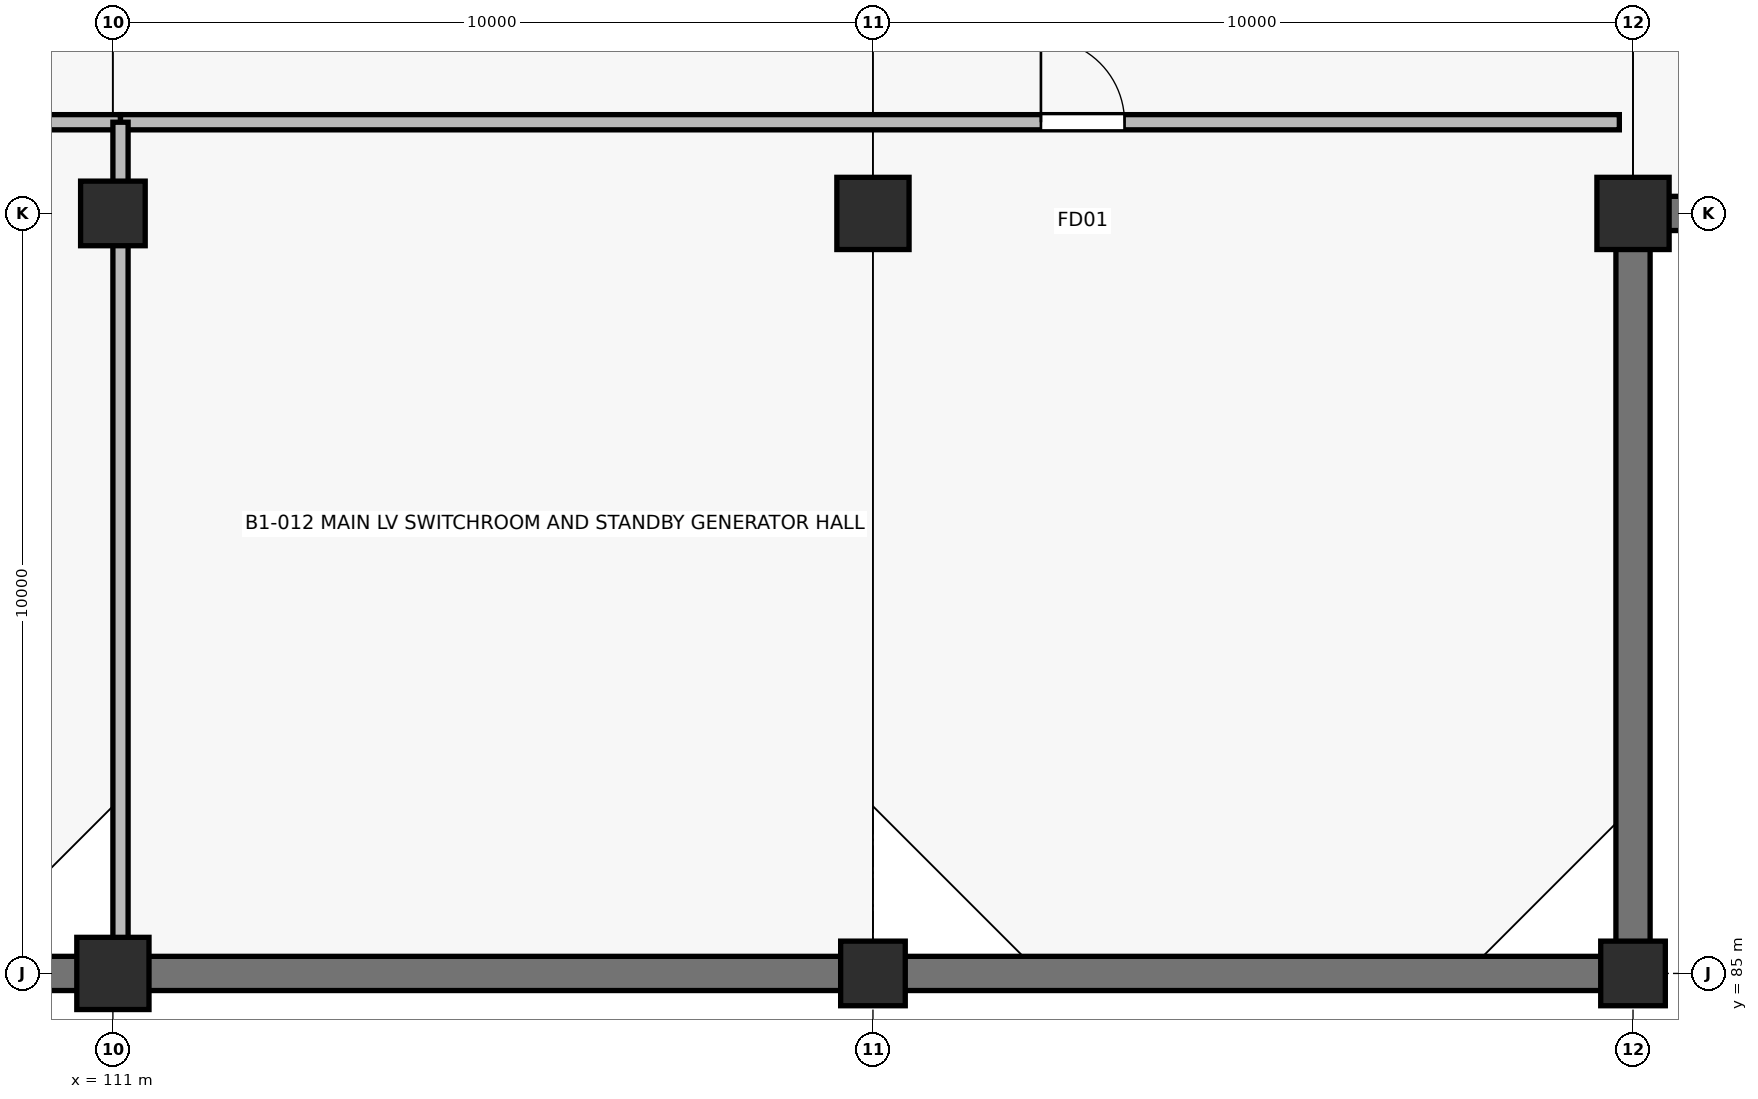
"""IFC4 building model, lengths in metres.
Left out: names, types, materials, properties, quantities, classifications, styles, units other than length and angle.
Written with IfcOpenShell. Run it as: python <this file> out.ifc"""

import sys

from ifc_helpers import new_model, si_unit, direction, frame, frame_2d, origin, origin_2d, place, context, subcontext, project, spatial, rectangle, extrude, element, fill, save


model = new_model("IFC4")
c1 = context("Model", 3, precision=1e-05, world=origin(), true_north=direction((0.0, 1.0)))
c2 = subcontext(c1, "Body", "Model", "MODEL_VIEW")
j1 = project(units=[si_unit("LENGTHUNIT", "METRE"), si_unit("PLANEANGLEUNIT", "RADIAN")], contexts=[c1])
p1 = place(None, origin())
s1 = spatial("IfcSite", under=j1, at=p1, CompositionType="ELEMENT")
p2 = place(p1, origin())
s2 = spatial("IfcBuilding", under=s1, at=p2, CompositionType="ELEMENT")
p3 = place(p2, frame((0.0, 0.0, -4.5)))
s3 = spatial("IfcBuildingStorey", under=s2, at=p3, CompositionType="ELEMENT", Elevation=-4.5)
p4 = place(p3, frame((111.0, 85.0, 0.0), z_axis=(0.0, 0.0, 1.0), x_axis=(1.0, 0.0, 0.0)))
e1 = element("IfcColumn", 1, at=p4, inside=s3, PredefinedType="COLUMN", context=c2, shape_type="SweptSolid", body=[
    extrude(rectangle(XDim=0.95, YDim=0.95, at=origin_2d()), origin(), (0.0, 0.0, 1.0), 4.5),
])
for number, where, z_axis, x_axis in (
    (2, (111.0, 95.0, 0.0), (0.0, 0.0, 1.0), (1.0, 0.0, 0.0)),
    (3, (121.0, 85.0, 0.0), (0.0, 0.0, 1.0), (1.0, 0.0, 0.0)),
):
    element("IfcColumn", number, at=place(p3, frame(where, z_axis=z_axis, x_axis=x_axis)), inside=s3, PredefinedType="COLUMN", context=c2, shape_type="SweptSolid", body=[
        extrude(rectangle(XDim=0.85, YDim=0.85, at=origin_2d()), origin(), (0.0, 0.0, 1.0), 4.5),
    ])
p5 = place(p3, frame((121.0, 95.0, 0.0), z_axis=(0.0, 0.0, 1.0), x_axis=(1.0, 0.0, 0.0)))
e4 = element("IfcColumn", 4, at=p5, inside=s3, PredefinedType="COLUMN", context=c2, shape_type="SweptSolid", body=[
    extrude(rectangle(XDim=0.95, YDim=0.95, at=origin_2d()), origin(), (0.0, 0.0, 1.0), 4.5),
])
p6 = place(p3, frame((131.0, 85.0, 0.0), z_axis=(0.0, 0.0, 1.0), x_axis=(1.0, 0.0, 0.0)))
e5 = element("IfcColumn", 5, at=p6, inside=s3, PredefinedType="COLUMN", context=c2, shape_type="SweptSolid", body=[
    extrude(rectangle(XDim=0.85, YDim=0.85, at=origin_2d()), origin(), (0.0, 0.0, 1.0), 4.5),
])
p7 = place(p3, frame((131.0, 95.0, 0.0), z_axis=(0.0, 0.0, 1.0), x_axis=(1.0, 0.0, 0.0)))
e6 = element("IfcColumn", 6, at=p7, inside=s3, PredefinedType="COLUMN", context=c2, shape_type="SweptSolid", body=[
    extrude(rectangle(XDim=0.95, YDim=0.95, at=origin_2d()), origin(), (0.0, 0.0, 1.0), 4.5),
])
p8 = place(p3, frame((161.0, 95.0, 0.0), z_axis=(0.0, 0.0, 1.0), x_axis=(-1.0, 0.0, 0.0)))
e7 = element("IfcWall", 7, at=p8, inside=s3, PredefinedType="SOLIDWALL", context=c2, shape_type="SweptSolid", body=[
    extrude(rectangle(XDim=30.0, YDim=0.45, at=frame_2d((15.0, 0.0))), origin(), (0.0, 0.0, 1.0), 4.5),
])
p9 = place(p3, frame((131.0, 95.0, 0.0), z_axis=(0.0, 0.0, 1.0), x_axis=(0.0, -1.0, 0.0)))
e8 = element("IfcWall", 8, at=p9, inside=s3, PredefinedType="SOLIDWALL", context=c2, shape_type="SweptSolid", body=[
    extrude(rectangle(XDim=10.0, YDim=0.45, at=frame_2d((5.0, 0.0))), origin(), (0.0, 0.0, 1.0), 4.5),
])
p10 = place(p3, frame((131.0, 85.0, 0.0), z_axis=(0.0, 0.0, 1.0), x_axis=(-1.0, 0.0, 0.0)))
e9 = element("IfcWall", 9, at=p10, inside=s3, PredefinedType="SOLIDWALL", context=c2, shape_type="SweptSolid", body=[
    extrude(rectangle(XDim=88.0, YDim=0.45, at=frame_2d((44.0, 0.0))), origin(), (0.0, 0.0, 1.0), 4.5),
])
p11 = place(p3, frame((91.1, 96.2, 0.0), z_axis=(0.0, 0.0, 1.0), x_axis=(1.0, 0.0, 0.0)))
e10 = element("IfcWall", 10, at=p11, inside=s3, PredefinedType="PARTITIONING", context=c2, shape_type="SweptSolid", body=[
    extrude(rectangle(XDim=20.0, YDim=0.2, at=frame_2d((10.0, 0.0))), origin(), (0.0, 0.0, 1.0), 3.275),
])
p12 = place(p11, frame((12.25, 0.0, 0.0)))
e11 = element("IfcOpeningElement", 11, at=p12, cuts=e10, PredefinedType="OPENING", context=c2, shape_type="SweptSolid", body=[
    extrude(rectangle(XDim=1.1, YDim=2.15, at=frame_2d((0.55, 1.075))), frame((0.0, 0.11, 0.0), z_axis=(0.0, -1.0, 0.0), x_axis=(1.0, 0.0, 0.0)), (0.0, 0.0, 1.0), 0.22),
])
p13 = place(p3, frame((111.1, 96.2, 0.0), z_axis=(0.0, 0.0, 1.0), x_axis=(1.0, 0.0, 0.0)))
e12 = element("IfcWall", 12, at=p13, inside=s3, PredefinedType="PARTITIONING", context=c2, shape_type="SweptSolid", body=[
    extrude(rectangle(XDim=19.72, YDim=0.2, at=frame_2d((9.86, 0.0))), origin(), (0.0, 0.0, 1.0), 3.275),
])
p14 = place(p13, frame((12.11, 0.0, 0.0)))
e13 = element("IfcOpeningElement", 13, at=p14, cuts=e12, PredefinedType="OPENING", context=c2, shape_type="SweptSolid", body=[
    extrude(rectangle(XDim=1.1, YDim=2.15, at=frame_2d((0.55, 1.075))), frame((0.0, 0.11, 0.0), z_axis=(0.0, -1.0, 0.0), x_axis=(1.0, 0.0, 0.0)), (0.0, 0.0, 1.0), 0.22),
])
p15 = place(p3, frame((111.1, 85.22, 0.0), z_axis=(0.0, 0.0, 1.0), x_axis=(0.0, 1.0, 0.0)))
e14 = element("IfcWall", 14, at=p15, inside=s3, PredefinedType="PARTITIONING", context=c2, shape_type="SweptSolid", body=[
    extrude(rectangle(XDim=10.98, YDim=0.2, at=frame_2d((5.49, 0.0))), origin(), (0.0, 0.0, 1.0), 3.175),
])
p16 = place(p14, origin())
e15 = element("IfcDoor", 15, at=p16, inside=s3, OperationType="SINGLE_SWING_LEFT", PredefinedType="DOOR", context=c2, shape_type="SweptSolid", body=[
    extrude(rectangle(XDim=1.1, YDim=2.15, at=frame_2d((0.55, 1.075))), frame((0.0, 0.025, 0.0), z_axis=(0.0, -1.0, 0.0), x_axis=(1.0, 0.0, 0.0)), (0.0, 0.0, 1.0), 0.05),
])
fill(e13, e15)
save(model, sys.argv[1])
